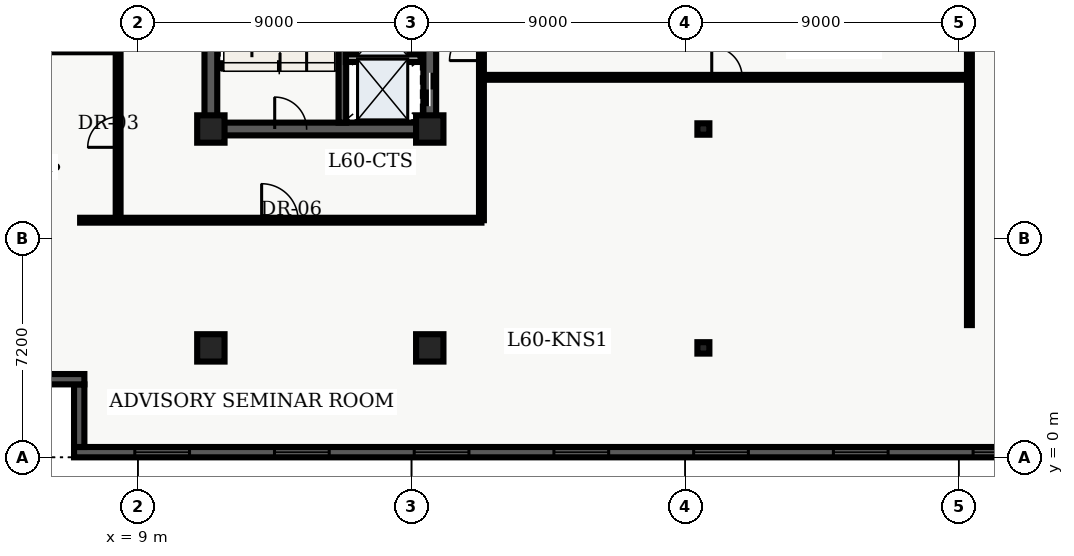
"""IFC4 building model, lengths in metres.
Left out: names, types, materials, properties, quantities, classifications, styles, units other than length and angle.
Written with IfcOpenShell. Run it as: python <this file> out.ifc"""

import sys

from ifc_helpers import new_model, entity, si_unit, converted_unit, direction, frame, origin_with_axes, origin_2d_with_axis, place, context, subcontext, project, spatial, polyline, rectangle, i_section, outline, extrude, element, fill, save


model = new_model("IFC4")
c1 = context("Model", 3, precision=1e-05, world=origin_with_axes(), true_north=direction((0.0, 1.0)))
c2 = subcontext(c1, "Body", "Model", "MODEL_VIEW")
j1 = project(units=[si_unit("LENGTHUNIT", "METRE"), converted_unit("PLANEANGLEUNIT", "DEGREE", entity("IfcPlaneAngleMeasure", 0.017), si_unit("PLANEANGLEUNIT", "RADIAN"), dimensions=[0, 0, 0, 0, 0, 0, 0])], contexts=[c1])
p1 = place(None, origin_with_axes())
s1 = spatial("IfcSite", under=j1, at=p1, CompositionType="ELEMENT")
p2 = place(p1, origin_with_axes())
s2 = spatial("IfcBuilding", under=s1, at=p2, CompositionType="ELEMENT")
p3 = place(p2, frame((0.0, 0.0, 244.2), z_axis=(0.0, 0.0, 1.0), x_axis=(1.0, 0.0, 0.0)))
s3 = spatial("IfcBuildingStorey", under=s2, at=p3, CompositionType="ELEMENT", Elevation=244.2)
p4 = place(p3, frame((11.4, 10.8, 0.0), z_axis=(0.0, 0.0, 1.0), x_axis=(0.0, 1.0, 0.0)))
e1 = element("IfcWall", 1, at=p4, inside=s3, PredefinedType="SHEAR", context=c2, shape_type="SweptSolid", body=[
    extrude(outline(polyline([(0.0, -0.21), (27.0, -0.21), (27.0, 0.21), (0.0, 0.21), (0.0, -0.21)])), origin_with_axes(), (0.0, 0.0, 1.0), 3.6),
])
p5 = place(p3, frame((11.4, 10.8, 0.0), z_axis=(0.0, 0.0, 1.0), x_axis=(1.0, 0.0, 0.0)))
e2 = element("IfcWall", 2, at=p5, inside=s3, PredefinedType="SHEAR", context=c2, shape_type="SweptSolid", body=[
    extrude(outline(polyline([(0.0, -0.21), (7.2, -0.21), (7.2, 0.21), (0.0, 0.21), (0.0, -0.21)])), origin_with_axes(), (0.0, 0.0, 1.0), 3.6),
])
p6 = place(p5, frame((2.625, 0.0, 0.0), z_axis=(0.0, 0.0, 1.0), x_axis=(1.0, 0.0, 0.0)))
e3 = element("IfcOpeningElement", 3, at=p6, cuts=e2, PredefinedType="OPENING", context=c2, shape_type="SweptSolid", body=[
    extrude(rectangle(XDim=1.05, YDim=0.44, at=origin_2d_with_axis()), origin_with_axes(), (0.0, 0.0, 1.0), 2.15),
])
p7 = place(p3, frame((18.6, 10.8, 0.0), z_axis=(0.0, 0.0, 1.0), x_axis=(0.0, 1.0, 0.0)))
e4 = element("IfcWall", 4, at=p7, inside=s3, PredefinedType="SHEAR", context=c2, shape_type="SweptSolid", body=[
    extrude(outline(polyline([(0.0, -0.21), (13.5, -0.21), (13.5, 0.21), (0.0, 0.21), (0.0, -0.21)])), origin_with_axes(), (0.0, 0.0, 1.0), 3.6),
])
p8 = place(p7, frame((1.3, 0.0, 0.0), z_axis=(0.0, 0.0, 1.0), x_axis=(1.0, 0.0, 0.0)))
e5 = element("IfcOpeningElement", 5, at=p8, cuts=e4, PredefinedType="OPENING", context=c2, shape_type="SweptSolid", body=[
    extrude(rectangle(XDim=1.1, YDim=0.44, at=origin_2d_with_axis()), origin_with_axes(), (0.0, 0.0, 1.0), 2.15),
])
p9 = place(p7, frame((3.4, 0.0, 0.0), z_axis=(0.0, 0.0, 1.0), x_axis=(1.0, 0.0, 0.0)))
e6 = element("IfcOpeningElement", 6, at=p9, cuts=e4, PredefinedType="OPENING", context=c2, shape_type="SweptSolid", body=[
    extrude(rectangle(XDim=1.1, YDim=0.44, at=origin_2d_with_axis()), origin_with_axes(), (0.0, 0.0, 1.0), 2.15),
])
p10 = place(p7, frame((11.125, 0.0, 0.0), z_axis=(0.0, 0.0, 1.0), x_axis=(1.0, 0.0, 0.0)))
e7 = element("IfcOpeningElement", 7, at=p10, cuts=e4, PredefinedType="OPENING", context=c2, shape_type="SweptSolid", body=[
    extrude(rectangle(XDim=1.05, YDim=0.44, at=origin_2d_with_axis()), origin_with_axes(), (0.0, 0.0, 1.0), 2.15),
])
p11 = place(p7, frame((6.675, 0.0, 0.0), z_axis=(0.0, 0.0, 1.0), x_axis=(1.0, 0.0, 0.0)))
e8 = element("IfcOpeningElement", 8, at=p11, cuts=e4, PredefinedType="OPENING", context=c2, shape_type="SweptSolid", body=[
    extrude(rectangle(XDim=0.95, YDim=0.44, at=origin_2d_with_axis()), origin_with_axes(), (0.0, 0.0, 1.0), 2.15),
])
p12 = place(p3, frame((15.725, 11.01, 0.0), z_axis=(0.0, 0.0, 1.0), x_axis=(0.0, 1.0, 0.0)))
e9 = element("IfcWall", 9, at=p12, inside=s3, PredefinedType="SHEAR", context=c2, shape_type="SweptSolid", body=[
    extrude(outline(polyline([(0.0, -0.125), (8.69, -0.125), (8.69, 0.125), (0.0, 0.125), (0.0, -0.125)])), origin_with_axes(), (0.0, 0.0, 1.0), 3.6),
])
for number, where, z_axis, x_axis in (
    (10, (11.4, 3.6, 0.0), (0.0, 0.0, 1.0), (1.0, 0.0, 0.0)),
    (11, (11.4, 10.8, 0.0), (0.0, 0.0, 1.0), (1.0, 0.0, 0.0)),
    (12, (18.6, 3.6, 0.0), (0.0, 0.0, 1.0), (1.0, 0.0, 0.0)),
    (13, (18.6, 10.8, 0.0), (0.0, 0.0, 1.0), (1.0, 0.0, 0.0)),
):
    element("IfcColumn", number, at=place(p3, frame(where, z_axis=z_axis, x_axis=x_axis)), inside=s3, PredefinedType="COLUMN", context=c2, shape_type="SweptSolid", body=[
        extrude(rectangle(XDim=0.9, YDim=0.9, at=origin_2d_with_axis()), origin_with_axes(), (0.0, 0.0, 1.0), 3.9),
    ])
for number, where, z_axis, x_axis in (
    (14, (27.6, 3.6, 0.0), (0.0, 0.0, 1.0), (1.0, 0.0, 0.0)),
    (15, (27.6, 10.8, 0.0), (0.0, 0.0, 1.0), (1.0, 0.0, 0.0)),
):
    element("IfcColumn", number, at=place(p3, frame(where, z_axis=z_axis, x_axis=x_axis)), inside=s3, PredefinedType="COLUMN", context=c2, shape_type="SweptSolid", body=[
        extrude(i_section(OverallWidth=0.394, OverallDepth=0.375, WebThickness=0.017, FlangeThickness=0.028, FilletRadius=0.02, at=origin_2d_with_axis()), origin_with_axes(), (0.0, 0.0, 1.0), 3.9),
    ])
p13 = place(p3, frame((15.84, 13.13, 0.0), z_axis=(0.0, 0.0, 1.0), x_axis=(1.0, 0.0, 0.0)))
e16 = element("IfcWall", 16, at=p13, inside=s3, PredefinedType="SOLIDWALL", context=c2, shape_type="SweptSolid", body=[
    extrude(outline(polyline([(0.0, -0.125), (2.46, -0.125), (2.46, 0.125), (0.0, 0.125), (0.0, -0.125)])), origin_with_axes(), (0.0, 0.0, 1.0), 2.64),
])
p14 = place(p3, frame((7.1, 7.8, 0.0), z_axis=(0.0, 0.0, 1.0), x_axis=(1.0, 0.0, 0.0)))
e17 = element("IfcWall", 17, at=p14, inside=s3, PredefinedType="PARTITIONING", context=c2, shape_type="SweptSolid", body=[
    extrude(outline(polyline([(0.0, -0.08), (13.2, -0.08), (13.2, 0.08), (0.0, 0.08), (0.0, -0.08)])), origin_with_axes(), (0.0, 0.0, 1.0), 2.64),
])
p15 = place(p14, frame((6.57, 0.0, 0.0), z_axis=(0.0, 0.0, 1.0), x_axis=(1.0, 0.0, 0.0)))
e18 = element("IfcOpeningElement", 18, at=p15, cuts=e17, PredefinedType="OPENING", context=c2, shape_type="SweptSolid", body=[
    extrude(rectangle(XDim=1.2, YDim=0.18, at=origin_2d_with_axis()), origin_with_axes(), (0.0, 0.0, 1.0), 2.2),
])
p16 = place(p3, frame((20.3, 7.8, 0.0), z_axis=(0.0, 0.0, 1.0), x_axis=(0.0, 1.0, 0.0)))
e19 = element("IfcWall", 19, at=p16, inside=s3, PredefinedType="PARTITIONING", context=c2, shape_type="SweptSolid", body=[
    extrude(outline(polyline([(0.0, -0.08), (32.7, -0.08), (32.7, 0.08), (0.0, 0.08), (0.0, -0.08)])), origin_with_axes(), (0.0, 0.0, 1.0), 2.64),
])
p17 = place(p16, frame((17.794, 0.0, 0.0), z_axis=(0.0, 0.0, 1.0), x_axis=(1.0, 0.0, 0.0)))
e20 = element("IfcOpeningElement", 20, at=p17, cuts=e19, PredefinedType="OPENING", context=c2, shape_type="SweptSolid", body=[
    extrude(rectangle(XDim=1.0, YDim=0.18, at=origin_2d_with_axis()), origin_with_axes(), (0.0, 0.0, 1.0), 2.15),
])
p18 = place(p16, frame((22.145, 0.0, 0.0), z_axis=(0.0, 0.0, 1.0), x_axis=(1.0, 0.0, 0.0)))
e21 = element("IfcOpeningElement", 21, at=p18, cuts=e19, PredefinedType="OPENING", context=c2, shape_type="SweptSolid", body=[
    extrude(rectangle(XDim=1.0, YDim=0.18, at=origin_2d_with_axis()), origin_with_axes(), (0.0, 0.0, 1.0), 2.15),
])
p19 = place(p16, frame((26.855, 0.0, 0.0), z_axis=(0.0, 0.0, 1.0), x_axis=(1.0, 0.0, 0.0)))
e22 = element("IfcOpeningElement", 22, at=p19, cuts=e19, PredefinedType="OPENING", context=c2, shape_type="SweptSolid", body=[
    extrude(rectangle(XDim=1.0, YDim=0.18, at=origin_2d_with_axis()), origin_with_axes(), (0.0, 0.0, 1.0), 2.15),
])
p20 = place(p16, frame((5.775, 0.0, 0.0), z_axis=(0.0, 0.0, 1.0), x_axis=(1.0, 0.0, 0.0)))
e23 = element("IfcOpeningElement", 23, at=p20, cuts=e19, PredefinedType="OPENING", context=c2, shape_type="SweptSolid", body=[
    extrude(rectangle(XDim=1.05, YDim=0.18, at=origin_2d_with_axis()), origin_with_axes(), (0.0, 0.0, 1.0), 2.15),
])
p21 = place(p3, frame((8.35, 7.8, 0.0), z_axis=(0.0, 0.0, 1.0), x_axis=(0.0, 1.0, 0.0)))
e24 = element("IfcWall", 24, at=p21, inside=s3, PredefinedType="PARTITIONING", context=c2, shape_type="SweptSolid", body=[
    extrude(outline(polyline([(0.0, -0.08), (12.6, -0.08), (12.6, 0.08), (0.0, 0.08), (0.0, -0.08)])), origin_with_axes(), (0.0, 0.0, 1.0), 2.64),
])
p22 = place(p21, frame((2.897, 0.0, 0.0), z_axis=(0.0, 0.0, 1.0), x_axis=(1.0, 0.0, 0.0)))
e25 = element("IfcOpeningElement", 25, at=p22, cuts=e24, PredefinedType="OPENING", context=c2, shape_type="SweptSolid", body=[
    extrude(rectangle(XDim=1.0, YDim=0.18, at=origin_2d_with_axis()), origin_with_axes(), (0.0, 0.0, 1.0), 2.15),
])
p23 = place(p21, frame((9.092, 0.0, 0.0), z_axis=(0.0, 0.0, 1.0), x_axis=(1.0, 0.0, 0.0)))
e26 = element("IfcOpeningElement", 26, at=p23, cuts=e24, PredefinedType="OPENING", context=c2, shape_type="SweptSolid", body=[
    extrude(rectangle(XDim=1.0, YDim=0.18, at=origin_2d_with_axis()), origin_with_axes(), (0.0, 0.0, 1.0), 2.15),
])
p24 = place(p3, frame((4.835, 13.465, 0.0), z_axis=(0.0, 0.0, 1.0), x_axis=(1.0, 0.0, 0.0)))
e27 = element("IfcWall", 27, at=p24, inside=s3, PredefinedType="PARTITIONING", context=c2, shape_type="SweptSolid", body=[
    extrude(outline(polyline([(0.0, -0.14), (3.395, -0.14), (3.395, 0.14), (0.0, 0.14), (0.0, -0.14)])), origin_with_axes(), (0.0, 0.0, 1.0), 2.64),
])
p25 = place(p3, frame((20.3, 12.5, 0.0), z_axis=(0.0, 0.0, 1.0), x_axis=(1.0, 0.0, 0.0)))
e28 = element("IfcWall", 28, at=p25, inside=s3, PredefinedType="PARTITIONING", context=c2, shape_type="SweptSolid", body=[
    extrude(outline(polyline([(0.0, -0.08), (16.05, -0.08), (16.05, 0.08), (0.0, 0.08), (0.0, -0.08)])), origin_with_axes(), (0.0, 0.0, 1.0), 2.64),
])
p26 = place(p25, frame((8.075, 0.0, 0.0), z_axis=(0.0, 0.0, 1.0), x_axis=(1.0, 0.0, 0.0)))
e29 = element("IfcOpeningElement", 29, at=p26, cuts=e28, PredefinedType="OPENING", context=c2, shape_type="SweptSolid", body=[
    extrude(rectangle(XDim=1.0, YDim=0.18, at=origin_2d_with_axis()), origin_with_axes(), (0.0, 0.0, 1.0), 2.15),
])
p27 = place(p3, frame((36.35, 4.35, 0.0), z_axis=(0.0, 0.0, 1.0), x_axis=(0.0, 1.0, 0.0)))
e30 = element("IfcWall", 30, at=p27, inside=s3, PredefinedType="PARTITIONING", context=c2, shape_type="SweptSolid", body=[
    extrude(outline(polyline([(0.0, -0.08), (16.95, -0.08), (16.95, 0.08), (0.0, 0.08), (0.0, -0.08)])), origin_with_axes(), (0.0, 0.0, 1.0), 2.64),
])
p28 = place(p3, frame((49.46, 0.17, 0.0), z_axis=(0.0, 0.0, 1.0), x_axis=(-1.0, 0.0, 0.0)))
e31 = element("IfcWall", 31, at=p28, inside=s3, PredefinedType="SOLIDWALL", context=c2, shape_type="SweptSolid", body=[
    extrude(outline(polyline([(0.0, -0.17), (42.56, -0.17), (42.56, 0.17), (0.0, 0.17), (0.0, -0.17)])), origin_with_axes(), (0.0, 0.0, 1.0), 3.6),
])
p29 = place(p28, frame((2.898, 0.0, 0.45), z_axis=(0.0, 0.0, 1.0), x_axis=(1.0, 0.0, 0.0)))
e32 = element("IfcOpeningElement", 32, at=p29, cuts=e31, PredefinedType="OPENING", context=c2, shape_type="SweptSolid", body=[
    extrude(rectangle(XDim=1.8, YDim=0.36, at=origin_2d_with_axis()), origin_with_axes(), (0.0, 0.0, 1.0), 2.1),
])
p30 = place(p28, frame((7.493, 0.0, 0.45), z_axis=(0.0, 0.0, 1.0), x_axis=(1.0, 0.0, 0.0)))
e33 = element("IfcOpeningElement", 33, at=p30, cuts=e31, PredefinedType="OPENING", context=c2, shape_type="SweptSolid", body=[
    extrude(rectangle(XDim=1.8, YDim=0.36, at=origin_2d_with_axis()), origin_with_axes(), (0.0, 0.0, 1.0), 2.1),
])
p31 = place(p28, frame((12.089, 0.0, 0.45), z_axis=(0.0, 0.0, 1.0), x_axis=(1.0, 0.0, 0.0)))
e34 = element("IfcOpeningElement", 34, at=p31, cuts=e31, PredefinedType="OPENING", context=c2, shape_type="SweptSolid", body=[
    extrude(rectangle(XDim=1.8, YDim=0.36, at=origin_2d_with_axis()), origin_with_axes(), (0.0, 0.0, 1.0), 2.1),
])
p32 = place(p28, frame((16.684, 0.0, 0.45), z_axis=(0.0, 0.0, 1.0), x_axis=(1.0, 0.0, 0.0)))
e35 = element("IfcOpeningElement", 35, at=p32, cuts=e31, PredefinedType="OPENING", context=c2, shape_type="SweptSolid", body=[
    extrude(rectangle(XDim=1.8, YDim=0.36, at=origin_2d_with_axis()), origin_with_axes(), (0.0, 0.0, 1.0), 2.1),
])
p33 = place(p28, frame((21.28, 0.0, 0.45), z_axis=(0.0, 0.0, 1.0), x_axis=(1.0, 0.0, 0.0)))
e36 = element("IfcOpeningElement", 36, at=p33, cuts=e31, PredefinedType="OPENING", context=c2, shape_type="SweptSolid", body=[
    extrude(rectangle(XDim=1.8, YDim=0.36, at=origin_2d_with_axis()), origin_with_axes(), (0.0, 0.0, 1.0), 2.1),
])
p34 = place(p28, frame((25.876, 0.0, 0.45), z_axis=(0.0, 0.0, 1.0), x_axis=(1.0, 0.0, 0.0)))
e37 = element("IfcOpeningElement", 37, at=p34, cuts=e31, PredefinedType="OPENING", context=c2, shape_type="SweptSolid", body=[
    extrude(rectangle(XDim=1.8, YDim=0.36, at=origin_2d_with_axis()), origin_with_axes(), (0.0, 0.0, 1.0), 2.1),
])
p35 = place(p28, frame((30.471, 0.0, 0.45), z_axis=(0.0, 0.0, 1.0), x_axis=(1.0, 0.0, 0.0)))
e38 = element("IfcOpeningElement", 38, at=p35, cuts=e31, PredefinedType="OPENING", context=c2, shape_type="SweptSolid", body=[
    extrude(rectangle(XDim=1.8, YDim=0.36, at=origin_2d_with_axis()), origin_with_axes(), (0.0, 0.0, 1.0), 2.1),
])
p36 = place(p28, frame((35.067, 0.0, 0.45), z_axis=(0.0, 0.0, 1.0), x_axis=(1.0, 0.0, 0.0)))
e39 = element("IfcOpeningElement", 39, at=p36, cuts=e31, PredefinedType="OPENING", context=c2, shape_type="SweptSolid", body=[
    extrude(rectangle(XDim=1.8, YDim=0.36, at=origin_2d_with_axis()), origin_with_axes(), (0.0, 0.0, 1.0), 2.1),
])
p37 = place(p28, frame((39.662, 0.0, 0.45), z_axis=(0.0, 0.0, 1.0), x_axis=(1.0, 0.0, 0.0)))
e40 = element("IfcOpeningElement", 40, at=p37, cuts=e31, PredefinedType="OPENING", context=c2, shape_type="SweptSolid", body=[
    extrude(rectangle(XDim=1.8, YDim=0.36, at=origin_2d_with_axis()), origin_with_axes(), (0.0, 0.0, 1.0), 2.1),
])
p38 = place(p3, frame((7.07, 0.34, 0.0), z_axis=(0.0, 0.0, 1.0), x_axis=(0.0, 1.0, 0.0)))
e41 = element("IfcWall", 41, at=p38, inside=s3, PredefinedType="SOLIDWALL", context=c2, shape_type="SweptSolid", body=[
    extrude(outline(polyline([(0.0, -0.17), (2.06, -0.17), (2.06, 0.17), (0.0, 0.17), (0.0, -0.17)])), origin_with_axes(), (0.0, 0.0, 1.0), 3.6),
])
p39 = place(p3, frame((7.24, 2.57, 0.0), z_axis=(0.0, 0.0, 1.0), x_axis=(-1.0, 0.0, 0.0)))
e42 = element("IfcWall", 42, at=p39, inside=s3, PredefinedType="SOLIDWALL", context=c2, shape_type="SweptSolid", body=[
    extrude(outline(polyline([(0.0, -0.17), (2.74, -0.17), (2.74, 0.17), (0.0, 0.17), (0.0, -0.17)])), origin_with_axes(), (0.0, 0.0, 1.0), 3.6),
])
p40 = place(p7, frame((1.3, 0.0, 0.0), z_axis=(0.0, 0.0, 1.0), x_axis=(1.0, 0.0, 0.0)))
e43 = element("IfcDoor", 43, at=p40, inside=s3, OperationType="SLIDING_TO_LEFT", PredefinedType="DOOR", context=c2, shape_type="SweptSolid", body=[
    extrude(rectangle(XDim=1.1, YDim=0.09, at=origin_2d_with_axis()), origin_with_axes(), (0.0, 0.0, 1.0), 2.15),
])
fill(e5, e43)
p41 = place(p5, frame((2.625, 0.0, 0.0), z_axis=(0.0, 0.0, 1.0), x_axis=(1.0, 0.0, 0.0)))
e44 = element("IfcDoor", 44, at=p41, inside=s3, OperationType="SINGLE_SWING_LEFT", PredefinedType="DOOR", context=c2, shape_type="SweptSolid", body=[
    extrude(rectangle(XDim=1.05, YDim=0.09, at=origin_2d_with_axis()), origin_with_axes(), (0.0, 0.0, 1.0), 2.15),
])
fill(e3, e44)
p42 = place(p21, frame((2.897, 0.0, 0.0), z_axis=(0.0, 0.0, 1.0), x_axis=(1.0, 0.0, 0.0)))
e45 = element("IfcDoor", 45, at=p42, inside=s3, OperationType="SINGLE_SWING_LEFT", PredefinedType="DOOR", context=c2, shape_type="SweptSolid", body=[
    extrude(rectangle(XDim=1.0, YDim=0.09, at=origin_2d_with_axis()), origin_with_axes(), (0.0, 0.0, 1.0), 2.15),
])
fill(e25, e45)
p43 = place(p14, frame((6.57, 0.0, 0.0), z_axis=(0.0, 0.0, 1.0), x_axis=(1.0, 0.0, 0.0)))
e46 = element("IfcDoor", 46, at=p43, inside=s3, OperationType="SINGLE_SWING_LEFT", PredefinedType="DOOR", context=c2, shape_type="SweptSolid", body=[
    extrude(rectangle(XDim=1.2, YDim=0.09, at=origin_2d_with_axis()), origin_with_axes(), (0.0, 0.0, 1.0), 2.2),
])
fill(e18, e46)
p44 = place(p16, frame((5.775, 0.0, 0.0), z_axis=(0.0, 0.0, 1.0), x_axis=(1.0, 0.0, 0.0)))
e47 = element("IfcDoor", 47, at=p44, inside=s3, OperationType="SINGLE_SWING_LEFT", PredefinedType="DOOR", context=c2, shape_type="SweptSolid", body=[
    extrude(rectangle(XDim=1.05, YDim=0.09, at=origin_2d_with_axis()), origin_with_axes(), (0.0, 0.0, 1.0), 2.15),
])
fill(e23, e47)
p45 = place(p25, frame((8.075, 0.0, 0.0), z_axis=(0.0, 0.0, 1.0), x_axis=(1.0, 0.0, 0.0)))
e48 = element("IfcDoor", 48, at=p45, inside=s3, OperationType="SINGLE_SWING_LEFT", PredefinedType="DOOR", context=c2, shape_type="SweptSolid", body=[
    extrude(rectangle(XDim=1.0, YDim=0.09, at=origin_2d_with_axis()), origin_with_axes(), (0.0, 0.0, 1.0), 2.15),
])
fill(e29, e48)
p46 = place(p28, frame((12.089, 0.0, 0.45), z_axis=(0.0, 0.0, 1.0), x_axis=(1.0, 0.0, 0.0)))
e49 = element("IfcWindow", 49, at=p46, inside=s3, PredefinedType="WINDOW", context=c2, shape_type="SweptSolid", body=[
    extrude(rectangle(XDim=1.8, YDim=0.09, at=origin_2d_with_axis()), origin_with_axes(), (0.0, 0.0, 1.0), 2.1),
])
fill(e34, e49)
p47 = place(p28, frame((16.684, 0.0, 0.45), z_axis=(0.0, 0.0, 1.0), x_axis=(1.0, 0.0, 0.0)))
e50 = element("IfcWindow", 50, at=p47, inside=s3, PredefinedType="WINDOW", context=c2, shape_type="SweptSolid", body=[
    extrude(rectangle(XDim=1.8, YDim=0.09, at=origin_2d_with_axis()), origin_with_axes(), (0.0, 0.0, 1.0), 2.1),
])
fill(e35, e50)
p48 = place(p28, frame((21.28, 0.0, 0.45), z_axis=(0.0, 0.0, 1.0), x_axis=(1.0, 0.0, 0.0)))
e51 = element("IfcWindow", 51, at=p48, inside=s3, PredefinedType="WINDOW", context=c2, shape_type="SweptSolid", body=[
    extrude(rectangle(XDim=1.8, YDim=0.09, at=origin_2d_with_axis()), origin_with_axes(), (0.0, 0.0, 1.0), 2.1),
])
fill(e36, e51)
p49 = place(p28, frame((25.876, 0.0, 0.45), z_axis=(0.0, 0.0, 1.0), x_axis=(1.0, 0.0, 0.0)))
e52 = element("IfcWindow", 52, at=p49, inside=s3, PredefinedType="WINDOW", context=c2, shape_type="SweptSolid", body=[
    extrude(rectangle(XDim=1.8, YDim=0.09, at=origin_2d_with_axis()), origin_with_axes(), (0.0, 0.0, 1.0), 2.1),
])
fill(e37, e52)
p50 = place(p28, frame((30.471, 0.0, 0.45), z_axis=(0.0, 0.0, 1.0), x_axis=(1.0, 0.0, 0.0)))
e53 = element("IfcWindow", 53, at=p50, inside=s3, PredefinedType="WINDOW", context=c2, shape_type="SweptSolid", body=[
    extrude(rectangle(XDim=1.8, YDim=0.09, at=origin_2d_with_axis()), origin_with_axes(), (0.0, 0.0, 1.0), 2.1),
])
fill(e38, e53)
p51 = place(p28, frame((35.067, 0.0, 0.45), z_axis=(0.0, 0.0, 1.0), x_axis=(1.0, 0.0, 0.0)))
e54 = element("IfcWindow", 54, at=p51, inside=s3, PredefinedType="WINDOW", context=c2, shape_type="SweptSolid", body=[
    extrude(rectangle(XDim=1.8, YDim=0.09, at=origin_2d_with_axis()), origin_with_axes(), (0.0, 0.0, 1.0), 2.1),
])
fill(e39, e54)
p52 = place(p28, frame((39.662, 0.0, 0.45), z_axis=(0.0, 0.0, 1.0), x_axis=(1.0, 0.0, 0.0)))
e55 = element("IfcWindow", 55, at=p52, inside=s3, PredefinedType="WINDOW", context=c2, shape_type="SweptSolid", body=[
    extrude(rectangle(XDim=1.8, YDim=0.09, at=origin_2d_with_axis()), origin_with_axes(), (0.0, 0.0, 1.0), 2.1),
])
fill(e40, e55)
save(model, sys.argv[1])
